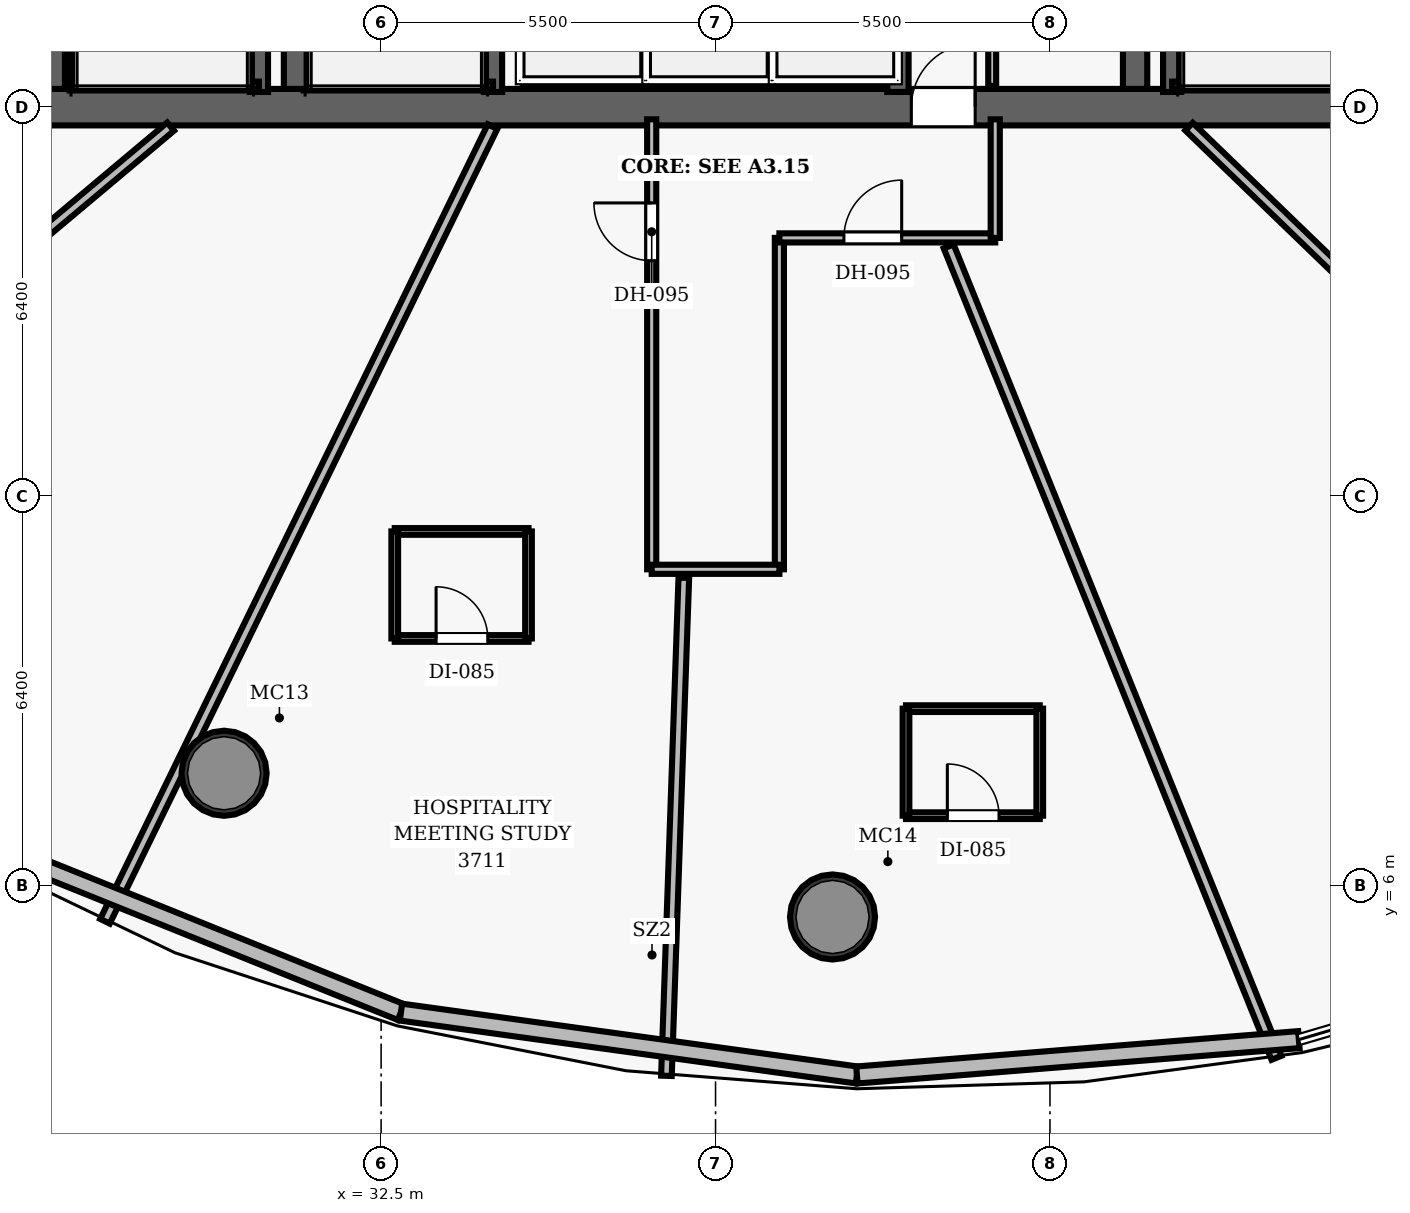
"""IFC4 building model, lengths in metres.
Left out: names, types, materials, properties, quantities, classifications, styles, units other than length and angle.
Written with IfcOpenShell. Run it as: python <this file> out.ifc"""

import sys

from ifc_helpers import new_model, si_unit, direction, frame, frame_2d, origin, origin_2d, place, context, subcontext, project, spatial, rectangle, hollow_circle, extrude, element, fill, save


model = new_model("IFC4")
c1 = context("Model", 3, precision=1e-05, world=origin(), true_north=direction((0.0, 1.0)))
c2 = subcontext(c1, "Body", "Model", "MODEL_VIEW")
j1 = project(units=[si_unit("LENGTHUNIT", "METRE"), si_unit("PLANEANGLEUNIT", "RADIAN")], contexts=[c1])
p1 = place(None, origin())
s1 = spatial("IfcSite", under=j1, at=p1, CompositionType="ELEMENT")
p2 = place(p1, origin())
s2 = spatial("IfcBuilding", under=s1, at=p2, CompositionType="ELEMENT")
p3 = place(p2, frame((0.0, 0.0, 148.3)))
s3 = spatial("IfcBuildingStorey", under=s2, at=p3, CompositionType="ELEMENT", Elevation=148.3)
p4 = place(p3, frame((26.7, 18.8, 0.0), z_axis=(0.0, 0.0, 1.0), x_axis=(1.0, 0.0, 0.0)))
e1 = element("IfcWall", 1, at=p4, inside=s3, PredefinedType="SHEAR", context=c2, shape_type="SweptSolid", body=[
    extrude(rectangle(XDim=22.6, YDim=0.6, at=frame_2d((11.3, 0.0))), origin(), (0.0, 0.0, 1.0), 3.5),
])
p5 = place(p4, frame((14.52, 0.0, 0.0)))
e2 = element("IfcOpeningElement", 2, at=p5, cuts=e1, PredefinedType="OPENING", context=c2, shape_type="SweptSolid", body=[
    extrude(rectangle(XDim=1.05, YDim=2.15, at=frame_2d((0.525, 1.075))), frame((0.0, 0.31, 0.0), z_axis=(0.0, -1.0, 0.0), x_axis=(1.0, 0.0, 0.0)), (0.0, 0.0, 1.0), 0.62),
])
p6 = place(p3, frame((27.0, 19.1, 0.0), z_axis=(0.0, 0.0, 1.0), x_axis=(0.0, 1.0, 0.0)))
e3 = element("IfcWall", 3, at=p6, inside=s3, PredefinedType="SHEAR", context=c2, shape_type="SweptSolid", body=[
    extrude(rectangle(XDim=13.8, YDim=0.6, at=frame_2d((6.9, 0.0))), origin(), (0.0, 0.0, 1.0), 3.5),
])
p7 = place(p6, frame((8.2, 0.0, 0.0)))
e4 = element("IfcOpeningElement", 4, at=p7, cuts=e3, PredefinedType="OPENING", context=c2, shape_type="SweptSolid", body=[
    extrude(rectangle(XDim=1.05, YDim=2.15, at=frame_2d((0.525, 1.075))), frame((0.0, 0.31, 0.0), z_axis=(0.0, -1.0, 0.0), x_axis=(1.0, 0.0, 0.0)), (0.0, 0.0, 1.0), 0.62),
])
for number, where, z_axis, x_axis in (
    (5, (31.1, 19.1, 0.0), (0.0, 0.0, 1.0), (0.0, 1.0, 0.0)),
    (6, (44.9, 19.1, 0.0), (0.0, 0.0, 1.0), (0.0, 1.0, 0.0)),
):
    element("IfcWall", number, at=place(p3, frame(where, z_axis=z_axis, x_axis=x_axis)), inside=s3, PredefinedType="SHEAR", context=c2, shape_type="SweptSolid", body=[
        extrude(rectangle(XDim=13.8, YDim=0.4, at=frame_2d((6.9, 0.0))), origin(), (0.0, 0.0, 1.0), 3.5),
    ])
for number, where, z_axis, x_axis in (
    (7, (29.917, 7.846, 0.0), (0.0, 0.0, 1.0), (1.0, 0.0, 0.0)),
    (8, (39.924, 5.483, 0.0), (0.0, 0.0, 1.0), (1.0, 0.0, 0.0)),
):
    element("IfcColumn", number, at=place(p3, frame(where, z_axis=z_axis, x_axis=x_axis)), inside=s3, PredefinedType="COLUMN", context=c2, shape_type="SweptSolid", body=[
        extrude(hollow_circle(Radius=0.7, WallThickness=0.055, at=origin_2d()), origin(), (0.0, 0.0, 1.0), 3.5),
    ])
p8 = place(p3, frame((30.49, 19.05, 0.0), z_axis=(0.0, 0.0, 1.0), x_axis=(0.0, 1.0, 0.0)))
e9 = element("IfcWall", 9, at=p8, inside=s3, PredefinedType="SHEAR", context=c2, shape_type="SweptSolid", body=[
    extrude(rectangle(XDim=7.5, YDim=0.3, at=frame_2d((3.75, 0.0))), origin(), (0.0, 0.0, 1.0), 3.5),
])
p9 = place(p3, frame((27.395, 19.1, 0.0), z_axis=(0.0, 0.0, 1.0), x_axis=(0.0, 1.0, 0.0)))
e10 = element("IfcWall", 10, at=p9, inside=s3, PredefinedType="SHEAR", context=c2, shape_type="SweptSolid", body=[
    extrude(rectangle(XDim=7.45, YDim=0.12, at=frame_2d((3.725, 0.0))), origin(), (0.0, 0.0, 1.0), 3.5),
])
p10 = place(p3, frame((27.395, 19.16, 0.0), z_axis=(0.0, 0.0, 1.0), x_axis=(1.0, 0.0, 0.0)))
e11 = element("IfcWall", 11, at=p10, inside=s3, PredefinedType="SHEAR", context=c2, shape_type="SweptSolid", body=[
    extrude(rectangle(XDim=3.095, YDim=0.12, at=frame_2d((1.547, 0.0))), origin(), (0.0, 0.0, 1.0), 3.5),
])
p11 = place(p3, frame((45.51, 19.05, 0.0), z_axis=(0.0, 0.0, 1.0), x_axis=(0.0, 1.0, 0.0)))
e12 = element("IfcWall", 12, at=p11, inside=s3, PredefinedType="SHEAR", context=c2, shape_type="SweptSolid", body=[
    extrude(rectangle(XDim=7.5, YDim=0.3, at=frame_2d((3.75, 0.0))), origin(), (0.0, 0.0, 1.0), 3.5),
])
p12 = place(p3, frame((45.51, 19.16, 0.0), z_axis=(0.0, 0.0, 1.0), x_axis=(1.0, 0.0, 0.0)))
e13 = element("IfcWall", 13, at=p12, inside=s3, PredefinedType="SHEAR", context=c2, shape_type="SweptSolid", body=[
    extrude(rectangle(XDim=3.095, YDim=0.12, at=frame_2d((1.547, 0.0))), origin(), (0.0, 0.0, 1.0), 3.5),
])
p13 = place(p3, frame((34.34, 19.05, 0.0), z_axis=(0.0, 0.0, 1.0), x_axis=(0.0, 1.0, 0.0)))
e14 = element("IfcWall", 14, at=p13, inside=s3, PredefinedType="SHEAR", context=c2, shape_type="SweptSolid", body=[
    extrude(rectangle(XDim=7.5, YDim=0.3, at=frame_2d((3.75, 0.0))), origin(), (0.0, 0.0, 1.0), 3.5),
])
p14 = place(p3, frame((31.3, 19.16, 0.0), z_axis=(0.0, 0.0, 1.0), x_axis=(1.0, 0.0, 0.0)))
e15 = element("IfcWall", 15, at=p14, inside=s3, PredefinedType="SHEAR", context=c2, shape_type="SweptSolid", body=[
    extrude(rectangle(XDim=3.04, YDim=0.12, at=frame_2d((1.52, 0.0))), origin(), (0.0, 0.0, 1.0), 3.5),
])
p15 = place(p3, frame((41.0, 19.05, 0.0), z_axis=(0.0, 0.0, 1.0), x_axis=(0.0, 1.0, 0.0)))
e16 = element("IfcWall", 16, at=p15, inside=s3, PredefinedType="SHEAR", context=c2, shape_type="SweptSolid", body=[
    extrude(rectangle(XDim=2.08, YDim=0.35, at=frame_2d((1.04, 0.0))), origin(), (0.0, 0.0, 1.0), 2.675),
])
p16 = place(p3, frame((42.55, 19.15, 0.0), z_axis=(0.0, 0.0, 1.0), x_axis=(0.0, 1.0, 0.0)))
e17 = element("IfcWall", 17, at=p16, inside=s3, PredefinedType="PARTITIONING", context=c2, shape_type="SweptSolid", body=[
    extrude(rectangle(XDim=2.75, YDim=0.13, at=frame_2d((1.375, 0.0))), origin(), (0.0, 0.0, 1.0), 2.675),
])
p17 = place(p16, frame((0.65, 0.0, 0.0)))
e18 = element("IfcOpeningElement", 18, at=p17, cuts=e17, PredefinedType="OPENING", context=c2, shape_type="SweptSolid", body=[
    extrude(rectangle(XDim=0.85, YDim=2.1, at=frame_2d((0.425, 1.05))), frame((0.0, 0.075, 0.0), z_axis=(0.0, -1.0, 0.0), x_axis=(1.0, 0.0, 0.0)), (0.0, 0.0, 1.0), 0.15),
])
p18 = place(p3, frame((36.95, 11.2, 0.0), z_axis=(0.0, 0.0, 1.0), x_axis=(0.0, 1.0, 0.0)))
e19 = element("IfcWall", 19, at=p18, inside=s3, PredefinedType="PARTITIONING", context=c2, shape_type="SweptSolid", body=[
    extrude(rectangle(XDim=7.4, YDim=0.15, at=frame_2d((3.7, 0.0))), origin(), (0.0, 0.0, 1.0), 2.675),
])
p19 = place(p18, frame((5.075, 0.0, 0.0)))
e20 = element("IfcOpeningElement", 20, at=p19, cuts=e19, PredefinedType="OPENING", context=c2, shape_type="SweptSolid", body=[
    extrude(rectangle(XDim=0.95, YDim=2.15, at=frame_2d((0.475, 1.075))), frame((0.0, 0.085, 0.0), z_axis=(0.0, -1.0, 0.0), x_axis=(1.0, 0.0, 0.0)), (0.0, 0.0, 1.0), 0.17),
])
p20 = place(p3, frame((39.05, 11.2, 0.0), z_axis=(0.0, 0.0, 1.0), x_axis=(0.0, 1.0, 0.0)))
e21 = element("IfcWall", 21, at=p20, inside=s3, PredefinedType="PARTITIONING", context=c2, shape_type="SweptSolid", body=[
    extrude(rectangle(XDim=5.45, YDim=0.15, at=frame_2d((2.725, 0.0))), origin(), (0.0, 0.0, 1.0), 2.675),
])
p21 = place(p3, frame((39.05, 16.65, 0.0), z_axis=(0.0, 0.0, 1.0), x_axis=(1.0, 0.0, 0.0)))
e22 = element("IfcWall", 22, at=p21, inside=s3, PredefinedType="PARTITIONING", context=c2, shape_type="SweptSolid", body=[
    extrude(rectangle(XDim=3.55, YDim=0.15, at=frame_2d((1.775, 0.0))), origin(), (0.0, 0.0, 1.0), 2.675),
])
p22 = place(p21, frame((1.061, 0.0, 0.0)))
e23 = element("IfcOpeningElement", 23, at=p22, cuts=e22, PredefinedType="OPENING", context=c2, shape_type="SweptSolid", body=[
    extrude(rectangle(XDim=0.95, YDim=2.15, at=frame_2d((0.475, 1.075))), frame((0.0, 0.085, 0.0), z_axis=(0.0, -1.0, 0.0), x_axis=(1.0, 0.0, 0.0)), (0.0, 0.0, 1.0), 0.17),
])
p23 = place(p3, frame((42.6, 16.65, 0.0), z_axis=(0.0, 0.0, 1.0), x_axis=(0.0, 1.0, 0.0)))
e24 = element("IfcWall", 24, at=p23, inside=s3, PredefinedType="PARTITIONING", context=c2, shape_type="SweptSolid", body=[
    extrude(rectangle(XDim=1.95, YDim=0.15, at=frame_2d((0.975, 0.0))), origin(), (0.0, 0.0, 1.0), 2.675),
])
p24 = place(p3, frame((36.95, 11.2, 0.0), z_axis=(0.0, 0.0, 1.0), x_axis=(1.0, 0.0, 0.0)))
e25 = element("IfcWall", 25, at=p24, inside=s3, PredefinedType="PARTITIONING", context=c2, shape_type="SweptSolid", body=[
    extrude(rectangle(XDim=2.1, YDim=0.15, at=frame_2d((1.05, 0.0))), origin(), (0.0, 0.0, 1.0), 2.675),
])
p25 = place(p3, frame((29.038, 18.48, 0.0), z_axis=(0.0, 0.0, 1.0), x_axis=(-0.766047971117, -0.642783405159, 0.0)))
e26 = element("IfcWall", 26, at=p25, inside=s3, PredefinedType="PARTITIONING", context=c2, shape_type="SweptSolid", body=[
    extrude(rectangle(XDim=11.939, YDim=0.175, at=frame_2d((5.97, 0.0))), origin(), (0.0, 0.0, 1.0), 2.675),
])
p26 = place(p3, frame((34.332, 18.48, 0.0), z_axis=(0.0, 0.0, 1.0), x_axis=(-0.438373347789, -0.898792972797, 0.0)))
e27 = element("IfcWall", 27, at=p26, inside=s3, PredefinedType="PARTITIONING", context=c2, shape_type="SweptSolid", body=[
    extrude(rectangle(XDim=14.54, YDim=0.175, at=frame_2d((7.27, 0.0))), origin(), (0.0, 0.0, 1.0), 2.675),
])
p27 = place(p3, frame((37.478, 11.06, 0.0), z_axis=(0.0, 0.0, 1.0), x_axis=(-0.034886043298, -0.999391296732, 0.0)))
e28 = element("IfcWall", 28, at=p27, inside=s3, PredefinedType="PARTITIONING", context=c2, shape_type="SweptSolid", body=[
    extrude(rectangle(XDim=8.195, YDim=0.175, at=frame_2d((4.097, 0.0))), origin(), (0.0, 0.0, 1.0), 2.675),
])
p28 = place(p3, frame((41.834, 16.51, 0.0), z_axis=(0.0, 0.0, 1.0), x_axis=(0.374608614268, -0.927183038087, 0.0)))
e29 = element("IfcWall", 29, at=p28, inside=s3, PredefinedType="PARTITIONING", context=c2, shape_type="SweptSolid", body=[
    extrude(rectangle(XDim=14.392, YDim=0.175, at=frame_2d((7.196, 0.0))), origin(), (0.0, 0.0, 1.0), 2.675),
])
p29 = place(p3, frame((45.787, 18.48, 0.0), z_axis=(0.0, 0.0, 1.0), x_axis=(0.719347752113, -0.694650136062, 0.0)))
e30 = element("IfcWall", 30, at=p29, inside=s3, PredefinedType="PARTITIONING", context=c2, shape_type="SweptSolid", body=[
    extrude(rectangle(XDim=16.449, YDim=0.175, at=frame_2d((8.225, 0.0))), origin(), (0.0, 0.0, 1.0), 2.675),
])
p30 = place(p3, frame((32.724, 10.063, 0.0), z_axis=(0.0, 0.0, 1.0), x_axis=(1.0, 0.0, 0.0)))
e31 = element("IfcWall", 31, at=p30, inside=s3, PredefinedType="PARTITIONING", context=c2, shape_type="SweptSolid", body=[
    extrude(rectangle(XDim=2.2, YDim=0.11, at=frame_2d((1.1, 0.0))), origin(), (0.0, 0.0, 1.0), 2.675),
])
p31 = place(p30, frame((0.68, 0.0, 0.0)))
e32 = element("IfcOpeningElement", 32, at=p31, cuts=e31, PredefinedType="OPENING", context=c2, shape_type="SweptSolid", body=[
    extrude(rectangle(XDim=0.85, YDim=2.1, at=frame_2d((0.425, 1.05))), frame((0.0, 0.065, 0.0), z_axis=(0.0, -1.0, 0.0), x_axis=(1.0, 0.0, 0.0)), (0.0, 0.0, 1.0), 0.13),
])
p32 = place(p3, frame((32.724, 11.823, 0.0), z_axis=(0.0, 0.0, 1.0), x_axis=(1.0, 0.0, 0.0)))
e33 = element("IfcWall", 33, at=p32, inside=s3, PredefinedType="PARTITIONING", context=c2, shape_type="SweptSolid", body=[
    extrude(rectangle(XDim=2.2, YDim=0.11, at=frame_2d((1.1, 0.0))), origin(), (0.0, 0.0, 1.0), 2.675),
])
for number, where, z_axis, x_axis in (
    (34, (32.724, 10.063, 0.0), (0.0, 0.0, 1.0), (0.0, 1.0, 0.0)),
    (35, (34.924, 10.063, 0.0), (0.0, 0.0, 1.0), (0.0, 1.0, 0.0)),
):
    element("IfcWall", number, at=place(p3, frame(where, z_axis=z_axis, x_axis=x_axis)), inside=s3, PredefinedType="PARTITIONING", context=c2, shape_type="SweptSolid", body=[
        extrude(rectangle(XDim=1.76, YDim=0.11, at=frame_2d((0.88, 0.0))), origin(), (0.0, 0.0, 1.0), 2.675),
    ])
p33 = place(p3, frame((41.132, 7.148, 0.0), z_axis=(0.0, 0.0, 1.0), x_axis=(1.0, 0.0, 0.0)))
e36 = element("IfcWall", 36, at=p33, inside=s3, PredefinedType="PARTITIONING", context=c2, shape_type="SweptSolid", body=[
    extrude(rectangle(XDim=2.2, YDim=0.11, at=frame_2d((1.1, 0.0))), origin(), (0.0, 0.0, 1.0), 2.675),
])
p34 = place(p33, frame((0.68, 0.0, 0.0)))
e37 = element("IfcOpeningElement", 37, at=p34, cuts=e36, PredefinedType="OPENING", context=c2, shape_type="SweptSolid", body=[
    extrude(rectangle(XDim=0.85, YDim=2.1, at=frame_2d((0.425, 1.05))), frame((0.0, 0.065, 0.0), z_axis=(0.0, -1.0, 0.0), x_axis=(1.0, 0.0, 0.0)), (0.0, 0.0, 1.0), 0.13),
])
p35 = place(p3, frame((41.132, 8.908, 0.0), z_axis=(0.0, 0.0, 1.0), x_axis=(1.0, 0.0, 0.0)))
e38 = element("IfcWall", 38, at=p35, inside=s3, PredefinedType="PARTITIONING", context=c2, shape_type="SweptSolid", body=[
    extrude(rectangle(XDim=2.2, YDim=0.11, at=frame_2d((1.1, 0.0))), origin(), (0.0, 0.0, 1.0), 2.675),
])
for number, where, z_axis, x_axis in (
    (39, (41.132, 7.148, 0.0), (0.0, 0.0, 1.0), (0.0, 1.0, 0.0)),
    (40, (43.332, 7.148, 0.0), (0.0, 0.0, 1.0), (0.0, 1.0, 0.0)),
):
    element("IfcWall", number, at=place(p3, frame(where, z_axis=z_axis, x_axis=x_axis)), inside=s3, PredefinedType="PARTITIONING", context=c2, shape_type="SweptSolid", body=[
        extrude(rectangle(XDim=1.76, YDim=0.11, at=frame_2d((0.88, 0.0))), origin(), (0.0, 0.0, 1.0), 2.675),
    ])
p36 = place(p3, frame((32.827, 3.918, 0.0), z_axis=(0.0, 0.0, 1.0), x_axis=(-0.927496504314, 0.373831826474, 0.0)))
e41 = element("IfcWall", 41, at=p36, inside=s3, PredefinedType="SOLIDWALL", context=c2, shape_type="SweptSolid", body=[
    extrude(rectangle(XDim=7.617, YDim=0.28, at=frame_2d((3.809, 0.0))), origin(), (0.0, 0.0, 1.0), 3.26),
])
p37 = place(p3, frame((40.325, 2.884, 0.0), z_axis=(0.0, 0.0, 1.0), x_axis=(-0.990626698593, 0.136597013269, 0.0)))
e42 = element("IfcWall", 42, at=p37, inside=s3, PredefinedType="SOLIDWALL", context=c2, shape_type="SweptSolid", body=[
    extrude(rectangle(XDim=7.569, YDim=0.28, at=frame_2d((3.785, 0.0))), origin(), (0.0, 0.0, 1.0), 3.26),
])
p38 = place(p3, frame((47.594, 3.466, 0.0), z_axis=(0.0, 0.0, 1.0), x_axis=(-0.996811764287, -0.079789138232, 0.0)))
e43 = element("IfcWall", 43, at=p38, inside=s3, PredefinedType="SOLIDWALL", context=c2, shape_type="SweptSolid", body=[
    extrude(rectangle(XDim=7.292, YDim=0.28, at=frame_2d((3.646, 0.0))), origin(), (0.0, 0.0, 1.0), 3.26),
])
p39 = place(p5, origin())
e44 = element("IfcDoor", 44, at=p39, inside=s3, OperationType="SINGLE_SWING_RIGHT", PredefinedType="DOOR", context=c2, shape_type="SweptSolid", body=[
    extrude(rectangle(XDim=1.05, YDim=2.15, at=frame_2d((0.525, 1.075))), frame((0.0, 0.025, 0.0), z_axis=(0.0, -1.0, 0.0), x_axis=(1.0, 0.0, 0.0)), (0.0, 0.0, 1.0), 0.05),
])
fill(e2, e44)
p40 = place(p19, origin())
e45 = element("IfcDoor", 45, at=p40, inside=s3, OperationType="SINGLE_SWING_RIGHT", PredefinedType="DOOR", context=c2, shape_type="SweptSolid", body=[
    extrude(rectangle(XDim=0.95, YDim=2.15, at=frame_2d((0.475, 1.075))), frame((0.0, 0.025, 0.0), z_axis=(0.0, -1.0, 0.0), x_axis=(1.0, 0.0, 0.0)), (0.0, 0.0, 1.0), 0.05),
])
fill(e20, e45)
p41 = place(p31, origin())
e46 = element("IfcDoor", 46, at=p41, inside=s3, OperationType="SINGLE_SWING_LEFT", PredefinedType="DOOR", context=c2, shape_type="SweptSolid", body=[
    extrude(rectangle(XDim=0.85, YDim=2.1, at=frame_2d((0.425, 1.05))), frame((0.0, 0.025, 0.0), z_axis=(0.0, -1.0, 0.0), x_axis=(1.0, 0.0, 0.0)), (0.0, 0.0, 1.0), 0.05),
])
fill(e32, e46)
p42 = place(p22, origin())
e47 = element("IfcDoor", 47, at=p42, inside=s3, OperationType="SINGLE_SWING_RIGHT", PredefinedType="DOOR", context=c2, shape_type="SweptSolid", body=[
    extrude(rectangle(XDim=0.95, YDim=2.15, at=frame_2d((0.475, 1.075))), frame((0.0, 0.025, 0.0), z_axis=(0.0, -1.0, 0.0), x_axis=(1.0, 0.0, 0.0)), (0.0, 0.0, 1.0), 0.05),
])
fill(e23, e47)
p43 = place(p34, origin())
e48 = element("IfcDoor", 48, at=p43, inside=s3, OperationType="SINGLE_SWING_LEFT", PredefinedType="DOOR", context=c2, shape_type="SweptSolid", body=[
    extrude(rectangle(XDim=0.85, YDim=2.1, at=frame_2d((0.425, 1.05))), frame((0.0, 0.025, 0.0), z_axis=(0.0, -1.0, 0.0), x_axis=(1.0, 0.0, 0.0)), (0.0, 0.0, 1.0), 0.05),
])
fill(e37, e48)
save(model, sys.argv[1])
